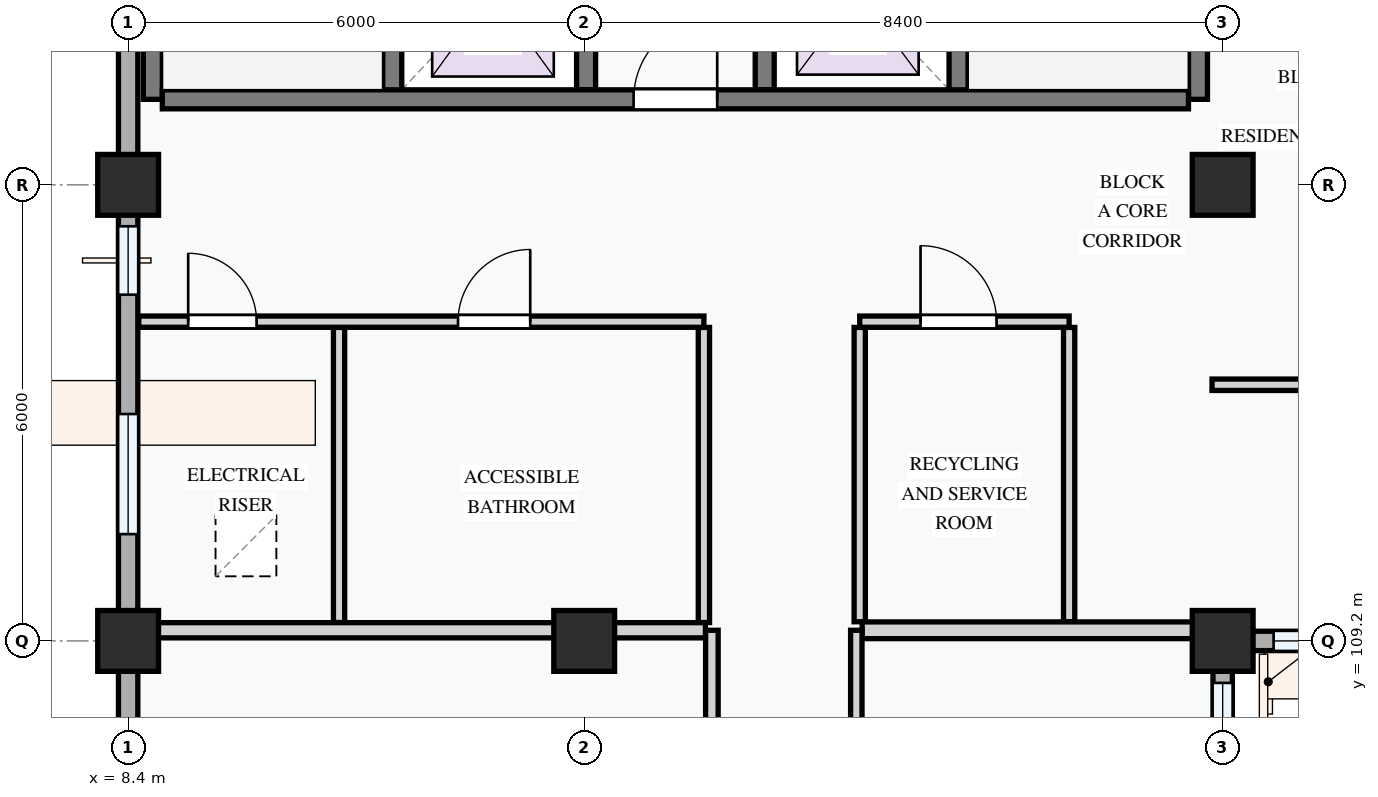
"""IFC4 building model, lengths in metres.
Left out: names, types, materials, properties, quantities, classifications, styles, units other than length and angle.
Written with IfcOpenShell. Run it as: python <this file> out.ifc"""

import sys

from ifc_helpers import new_model, si_unit, direction, frame, frame_2d, origin, origin_2d, place, context, subcontext, project, spatial, rectangle, extrude, element, fill, save


model = new_model("IFC4")
c1 = context("Model", 3, precision=1e-05, world=origin(), true_north=direction((0.0, 1.0)))
c2 = subcontext(c1, "Body", "Model", "MODEL_VIEW")
j1 = project(units=[si_unit("LENGTHUNIT", "METRE"), si_unit("PLANEANGLEUNIT", "RADIAN")], contexts=[c1])
p1 = place(None, origin())
s1 = spatial("IfcSite", under=j1, at=p1, CompositionType="ELEMENT")
p2 = place(p1, origin())
s2 = spatial("IfcBuilding", under=s1, at=p2, CompositionType="ELEMENT")
p3 = place(p2, frame((0.0, 0.0, 4.5)))
s3 = spatial("IfcBuildingStorey", under=s2, at=p3, CompositionType="ELEMENT", Elevation=4.5)
for number, where, z_axis, x_axis in (
    (1, (8.4, 109.2, 0.0), (0.0, 0.0, 1.0), (1.0, 0.0, 0.0)),
    (2, (8.4, 115.2, 0.0), (0.0, 0.0, 1.0), (1.0, 0.0, 0.0)),
    (3, (14.4, 109.2, 0.0), (0.0, 0.0, 1.0), (1.0, 0.0, 0.0)),
    (4, (22.8, 109.2, 0.0), (0.0, 0.0, 1.0), (1.0, 0.0, 0.0)),
    (5, (22.8, 115.2, 0.0), (0.0, 0.0, 1.0), (1.0, 0.0, 0.0)),
):
    element("IfcColumn", number, at=place(p3, frame(where, z_axis=z_axis, x_axis=x_axis)), inside=s3, PredefinedType="COLUMN", context=c2, shape_type="SweptSolid", body=[
        extrude(rectangle(XDim=0.8, YDim=0.8, at=origin_2d()), origin(), (0.0, 0.0, 1.0), 3.6),
    ])
p4 = place(p3, frame((22.8, 109.2, 0.0), z_axis=(0.0, 0.0, 1.0), x_axis=(1.0, 0.0, 0.0)))
e6 = element("IfcWall", 6, at=p4, inside=s3, PredefinedType="STANDARD", context=c2, shape_type="SweptSolid", body=[
    extrude(rectangle(XDim=6.0, YDim=0.255, at=frame_2d((3.0, 0.0))), origin(), (0.0, 0.0, 1.0), 2.775),
])
p5 = place(p4, frame((0.67, 0.0, 0.78)))
e7 = element("IfcOpeningElement", 7, at=p5, cuts=e6, PredefinedType="OPENING", context=c2, shape_type="SweptSolid", body=[
    extrude(rectangle(XDim=1.2, YDim=1.5, at=frame_2d((0.6, 0.75))), frame((0.0, 0.137, 0.0), z_axis=(0.0, -1.0, 0.0), x_axis=(1.0, 0.0, 0.0)), (0.0, 0.0, 1.0), 0.275),
])
p6 = place(p4, frame((2.88, 0.0, 0.78)))
e8 = element("IfcOpeningElement", 8, at=p6, cuts=e6, PredefinedType="OPENING", context=c2, shape_type="SweptSolid", body=[
    extrude(rectangle(XDim=2.4, YDim=1.85, at=frame_2d((1.2, 0.925))), frame((0.0, 0.137, 0.0), z_axis=(0.0, -1.0, 0.0), x_axis=(1.0, 0.0, 0.0)), (0.0, 0.0, 1.0), 0.275),
])
p7 = place(p3, frame((8.4, 123.6, 0.0), z_axis=(0.0, 0.0, 1.0), x_axis=(0.0, -1.0, 0.0)))
e9 = element("IfcWall", 9, at=p7, inside=s3, PredefinedType="STANDARD", context=c2, shape_type="SweptSolid", body=[
    extrude(rectangle(XDim=8.4, YDim=0.255, at=frame_2d((4.2, 0.0))), origin(), (0.0, 0.0, 1.0), 2.725),
])
p8 = place(p7, frame((1.336, 0.0, 0.78)))
e10 = element("IfcOpeningElement", 10, at=p8, cuts=e9, PredefinedType="OPENING", context=c2, shape_type="SweptSolid", body=[
    extrude(rectangle(XDim=1.32, YDim=1.35, at=frame_2d((0.66, 0.675))), frame((0.0, 0.137, 0.0), z_axis=(0.0, -1.0, 0.0), x_axis=(1.0, 0.0, 0.0)), (0.0, 0.0, 1.0), 0.275),
])
p9 = place(p7, frame((4.629, 0.0, 0.78)))
e11 = element("IfcOpeningElement", 11, at=p9, cuts=e9, PredefinedType="OPENING", context=c2, shape_type="SweptSolid", body=[
    extrude(rectangle(XDim=1.68, YDim=1.46, at=frame_2d((0.84, 0.73))), frame((0.0, 0.137, 0.0), z_axis=(0.0, -1.0, 0.0), x_axis=(1.0, 0.0, 0.0)), (0.0, 0.0, 1.0), 0.275),
])
p10 = place(p3, frame((8.4, 115.2, 0.0), z_axis=(0.0, 0.0, 1.0), x_axis=(0.0, -1.0, 0.0)))
e12 = element("IfcWall", 12, at=p10, inside=s3, PredefinedType="STANDARD", context=c2, shape_type="SweptSolid", body=[
    extrude(rectangle(XDim=6.0, YDim=0.255, at=frame_2d((3.0, 0.0))), origin(), (0.0, 0.0, 1.0), 2.875),
])
p11 = place(p10, frame((0.545, 0.0, 0.78)))
e13 = element("IfcOpeningElement", 13, at=p11, cuts=e12, PredefinedType="OPENING", context=c2, shape_type="SweptSolid", body=[
    extrude(rectangle(XDim=0.9, YDim=1.2, at=frame_2d((0.45, 0.6))), frame((0.0, 0.137, 0.0), z_axis=(0.0, -1.0, 0.0), x_axis=(1.0, 0.0, 0.0)), (0.0, 0.0, 1.0), 0.275),
])
p12 = place(p10, frame((3.015, 0.0, 0.78)))
e14 = element("IfcOpeningElement", 14, at=p12, cuts=e12, PredefinedType="OPENING", context=c2, shape_type="SweptSolid", body=[
    extrude(rectangle(XDim=1.58, YDim=1.48, at=frame_2d((0.79, 0.74))), frame((0.0, 0.137, 0.0), z_axis=(0.0, -1.0, 0.0), x_axis=(1.0, 0.0, 0.0)), (0.0, 0.0, 1.0), 0.275),
])
p13 = place(p3, frame((8.4, 109.2, 0.0), z_axis=(0.0, 0.0, 1.0), x_axis=(0.0, -1.0, 0.0)))
e15 = element("IfcWall", 15, at=p13, inside=s3, PredefinedType="STANDARD", context=c2, shape_type="SweptSolid", body=[
    extrude(rectangle(XDim=8.4, YDim=0.255, at=frame_2d((4.2, 0.0))), origin(), (0.0, 0.0, 1.0), 2.725),
])
p14 = place(p13, frame((1.133, 0.0, 0.78)))
e16 = element("IfcOpeningElement", 16, at=p14, cuts=e15, PredefinedType="OPENING", context=c2, shape_type="SweptSolid", body=[
    extrude(rectangle(XDim=1.42, YDim=1.38, at=frame_2d((0.71, 0.69))), frame((0.0, 0.137, 0.0), z_axis=(0.0, -1.0, 0.0), x_axis=(1.0, 0.0, 0.0)), (0.0, 0.0, 1.0), 0.275),
])
p15 = place(p13, frame((4.117, 0.0, 0.78)))
e17 = element("IfcOpeningElement", 17, at=p15, cuts=e15, PredefinedType="OPENING", context=c2, shape_type="SweptSolid", body=[
    extrude(rectangle(XDim=1.78, YDim=1.42, at=frame_2d((0.89, 0.71))), frame((0.0, 0.137, 0.0), z_axis=(0.0, -1.0, 0.0), x_axis=(1.0, 0.0, 0.0)), (0.0, 0.0, 1.0), 0.275),
])
p16 = place(p13, frame((6.985, 0.0, 0.78)))
e18 = element("IfcOpeningElement", 18, at=p16, cuts=e15, PredefinedType="OPENING", context=c2, shape_type="SweptSolid", body=[
    extrude(rectangle(XDim=0.9, YDim=1.2, at=frame_2d((0.45, 0.6))), frame((0.0, 0.137, 0.0), z_axis=(0.0, -1.0, 0.0), x_axis=(1.0, 0.0, 0.0)), (0.0, 0.0, 1.0), 0.275),
])
p17 = place(p3, frame((22.8, 100.8, 0.0), z_axis=(0.0, 0.0, 1.0), x_axis=(0.0, 1.0, 0.0)))
e19 = element("IfcWall", 19, at=p17, inside=s3, PredefinedType="STANDARD", context=c2, shape_type="SweptSolid", body=[
    extrude(rectangle(XDim=8.4, YDim=0.255, at=frame_2d((4.2, 0.0))), origin(), (0.0, 0.0, 1.0), 2.725),
])
p18 = place(p17, frame((0.515, 0.0, 0.78)))
e20 = element("IfcOpeningElement", 20, at=p18, cuts=e19, PredefinedType="OPENING", context=c2, shape_type="SweptSolid", body=[
    extrude(rectangle(XDim=0.9, YDim=1.2, at=frame_2d((0.45, 0.6))), frame((0.0, 0.137, 0.0), z_axis=(0.0, -1.0, 0.0), x_axis=(1.0, 0.0, 0.0)), (0.0, 0.0, 1.0), 0.275),
])
p19 = place(p17, frame((2.272, 0.0, 0.78)))
e21 = element("IfcOpeningElement", 21, at=p19, cuts=e19, PredefinedType="OPENING", context=c2, shape_type="SweptSolid", body=[
    extrude(rectangle(XDim=2.24, YDim=1.52, at=frame_2d((1.12, 0.76))), frame((0.0, 0.137, 0.0), z_axis=(0.0, -1.0, 0.0), x_axis=(1.0, 0.0, 0.0)), (0.0, 0.0, 1.0), 0.275),
])
p20 = place(p17, frame((5.268, 0.0, 0.78)))
e22 = element("IfcOpeningElement", 22, at=p20, cuts=e19, PredefinedType="OPENING", context=c2, shape_type="SweptSolid", body=[
    extrude(rectangle(XDim=2.58, YDim=1.48, at=frame_2d((1.29, 0.74))), frame((0.0, 0.137, 0.0), z_axis=(0.0, -1.0, 0.0), x_axis=(1.0, 0.0, 0.0)), (0.0, 0.0, 1.0), 0.275),
])
p21 = place(p3, frame((11.875, 123.25, 0.0), z_axis=(0.0, 0.0, 1.0), x_axis=(0.0, -1.0, 0.0)))
e23 = element("IfcWall", 23, at=p21, inside=s3, PredefinedType="SHEAR", context=c2, shape_type="SweptSolid", body=[
    extrude(rectangle(XDim=6.925, YDim=0.25, at=frame_2d((3.462, 0.0))), origin(), (0.0, 0.0, 1.0), 3.3),
])
p22 = place(p21, frame((0.35, 0.0, 0.0)))
e24 = element("IfcOpeningElement", 24, at=p22, cuts=e23, PredefinedType="OPENING", context=c2, shape_type="SweptSolid", body=[
    extrude(rectangle(XDim=0.95, YDim=2.1, at=frame_2d((0.475, 1.05))), frame((0.0, 0.135, 0.0), z_axis=(0.0, -1.0, 0.0), x_axis=(1.0, 0.0, 0.0)), (0.0, 0.0, 1.0), 0.27),
])
p23 = place(p3, frame((8.725, 123.4, 0.0), z_axis=(0.0, 0.0, 1.0), x_axis=(0.0, -1.0, 0.0)))
e25 = element("IfcWall", 25, at=p23, inside=s3, PredefinedType="SHEAR", context=c2, shape_type="SweptSolid", body=[
    extrude(rectangle(XDim=7.075, YDim=0.25, at=frame_2d((3.538, 0.0))), origin(), (0.0, 0.0, 1.0), 3.3),
])
p24 = place(p3, frame((22.475, 123.25, 0.0), z_axis=(0.0, 0.0, 1.0), x_axis=(0.0, -1.0, 0.0)))
e26 = element("IfcWall", 26, at=p24, inside=s3, PredefinedType="SHEAR", context=c2, shape_type="SweptSolid", body=[
    extrude(rectangle(XDim=6.925, YDim=0.25, at=frame_2d((3.462, 0.0))), origin(), (0.0, 0.0, 1.0), 3.3),
])
p25 = place(p3, frame((19.325, 123.25, 0.0), z_axis=(0.0, 0.0, 1.0), x_axis=(0.0, -1.0, 0.0)))
e27 = element("IfcWall", 27, at=p25, inside=s3, PredefinedType="SHEAR", context=c2, shape_type="SweptSolid", body=[
    extrude(rectangle(XDim=6.925, YDim=0.25, at=frame_2d((3.462, 0.0))), origin(), (0.0, 0.0, 1.0), 3.3),
])
p26 = place(p25, frame((0.35, 0.0, 0.0)))
e28 = element("IfcOpeningElement", 28, at=p26, cuts=e27, PredefinedType="OPENING", context=c2, shape_type="SweptSolid", body=[
    extrude(rectangle(XDim=0.95, YDim=2.1, at=frame_2d((0.475, 1.05))), frame((0.0, 0.135, 0.0), z_axis=(0.0, -1.0, 0.0), x_axis=(1.0, 0.0, 0.0)), (0.0, 0.0, 1.0), 0.27),
])
for number, where, z_axis, x_axis in (
    (29, (14.425, 118.875, 0.0), (0.0, 0.0, 1.0), (0.0, -1.0, 0.0)),
    (30, (16.775, 118.875, 0.0), (0.0, 0.0, 1.0), (0.0, -1.0, 0.0)),
):
    element("IfcWall", number, at=place(p3, frame(where, z_axis=z_axis, x_axis=x_axis)), inside=s3, PredefinedType="SHEAR", context=c2, shape_type="SweptSolid", body=[
        extrude(rectangle(XDim=2.425, YDim=0.25, at=frame_2d((1.212, 0.0))), origin(), (0.0, 0.0, 1.0), 3.3),
    ])
p27 = place(p3, frame((8.85, 116.325, 0.0), z_axis=(0.0, 0.0, 1.0), x_axis=(1.0, 0.0, 0.0)))
e31 = element("IfcWall", 31, at=p27, inside=s3, PredefinedType="SHEAR", context=c2, shape_type="SweptSolid", body=[
    extrude(rectangle(XDim=13.5, YDim=0.25, at=frame_2d((6.75, 0.0))), origin(), (0.0, 0.0, 1.0), 3.3),
])
p28 = place(p27, frame((6.2, 0.0, 0.0)))
e32 = element("IfcOpeningElement", 32, at=p28, cuts=e31, PredefinedType="OPENING", context=c2, shape_type="SweptSolid", body=[
    extrude(rectangle(XDim=1.1, YDim=2.15, at=frame_2d((0.55, 1.075))), frame((0.0, 0.135, 0.0), z_axis=(0.0, -1.0, 0.0), x_axis=(1.0, 0.0, 0.0)), (0.0, 0.0, 1.0), 0.27),
])
for number, where, z_axis, x_axis in (
    (33, (11.175, 113.324, 0.0), (0.0, 0.0, 1.0), (0.0, -1.0, 0.0)),
    (34, (15.975, 113.324, 0.0), (0.0, 0.0, 1.0), (0.0, -1.0, 0.0)),
):
    element("IfcWall", number, at=place(p3, frame(where, z_axis=z_axis, x_axis=x_axis)), inside=s3, PredefinedType="PARTITIONING", context=c2, shape_type="SweptSolid", body=[
        extrude(rectangle(XDim=3.882, YDim=0.148, at=frame_2d((1.941, 0.0))), origin(), (0.0, 0.0, 1.0), 3.3),
    ])
for number, where, z_axis, x_axis in (
    (35, (18.025, 113.324, 0.0), (0.0, 0.0, 1.0), (0.0, -1.0, 0.0)),
    (36, (20.78, 113.324, 0.0), (0.0, 0.0, 1.0), (0.0, -1.0, 0.0)),
):
    element("IfcWall", number, at=place(p3, frame(where, z_axis=z_axis, x_axis=x_axis)), inside=s3, PredefinedType="PARTITIONING", context=c2, shape_type="SweptSolid", body=[
        extrude(rectangle(XDim=3.872, YDim=0.148, at=frame_2d((1.936, 0.0))), origin(), (0.0, 0.0, 1.0), 3.3),
    ])
p29 = place(p3, frame((8.54, 113.4, 0.0), z_axis=(0.0, 0.0, 1.0), x_axis=(1.0, 0.0, 0.0)))
e37 = element("IfcWall", 37, at=p29, inside=s3, PredefinedType="PARTITIONING", context=c2, shape_type="SweptSolid", body=[
    extrude(rectangle(XDim=7.435, YDim=0.148, at=frame_2d((3.718, 0.0))), origin(), (0.0, 0.0, 1.0), 3.3),
])
p30 = place(p29, frame((0.65, 0.0, 0.0)))
e38 = element("IfcOpeningElement", 38, at=p30, cuts=e37, PredefinedType="OPENING", context=c2, shape_type="SweptSolid", body=[
    extrude(rectangle(XDim=0.9, YDim=2.1, at=frame_2d((0.45, 1.05))), frame((0.0, 0.084, 0.0), z_axis=(0.0, -1.0, 0.0), x_axis=(1.0, 0.0, 0.0)), (0.0, 0.0, 1.0), 0.168),
])
p31 = place(p29, frame((4.2, 0.0, 0.0)))
e39 = element("IfcOpeningElement", 39, at=p31, cuts=e37, PredefinedType="OPENING", context=c2, shape_type="SweptSolid", body=[
    extrude(rectangle(XDim=0.95, YDim=2.1, at=frame_2d((0.475, 1.05))), frame((0.0, 0.084, 0.0), z_axis=(0.0, -1.0, 0.0), x_axis=(1.0, 0.0, 0.0)), (0.0, 0.0, 1.0), 0.168),
])
p32 = place(p3, frame((18.025, 113.4, 0.0), z_axis=(0.0, 0.0, 1.0), x_axis=(1.0, 0.0, 0.0)))
e40 = element("IfcWall", 40, at=p32, inside=s3, PredefinedType="PARTITIONING", context=c2, shape_type="SweptSolid", body=[
    extrude(rectangle(XDim=2.755, YDim=0.148, at=frame_2d((1.377, 0.0))), origin(), (0.0, 0.0, 1.0), 3.3),
])
p33 = place(p32, frame((0.8, 0.0, 0.0)))
e41 = element("IfcOpeningElement", 41, at=p33, cuts=e40, PredefinedType="OPENING", context=c2, shape_type="SweptSolid", body=[
    extrude(rectangle(XDim=1.0, YDim=2.15, at=frame_2d((0.5, 1.075))), frame((0.0, 0.084, 0.0), z_axis=(0.0, -1.0, 0.0), x_axis=(1.0, 0.0, 0.0)), (0.0, 0.0, 1.0), 0.168),
])
p34 = place(p3, frame((22.66, 112.57, 0.0), z_axis=(0.0, 0.0, 1.0), x_axis=(1.0, 0.0, 0.0)))
e42 = element("IfcWall", 42, at=p34, inside=s3, PredefinedType="PARTITIONING", context=c2, shape_type="SweptSolid", body=[
    extrude(rectangle(XDim=2.406, YDim=0.15, at=frame_2d((1.203, 0.0))), origin(), (0.0, 0.0, 1.0), 3.3),
])
p35 = place(p3, frame((8.53, 109.34, 0.0), z_axis=(0.0, 0.0, 1.0), x_axis=(1.0, 0.0, 0.0)))
e43 = element("IfcWall", 43, at=p35, inside=s3, PredefinedType="PARTITIONING", context=c2, shape_type="SweptSolid", body=[
    extrude(rectangle(XDim=7.466, YDim=0.2, at=frame_2d((3.733, 0.0))), origin(), (0.0, 0.0, 1.0), 2.675),
])
p36 = place(p3, frame((18.057, 109.34, 0.0), z_axis=(0.0, 0.0, 1.0), x_axis=(1.0, 0.0, 0.0)))
e44 = element("IfcWall", 44, at=p36, inside=s3, PredefinedType="PARTITIONING", context=c2, shape_type="SweptSolid", body=[
    extrude(rectangle(XDim=4.683, YDim=0.22, at=frame_2d((2.342, 0.0))), origin(), (0.0, 0.0, 1.0), 2.675),
])
p37 = place(p3, frame((16.08, 72.06, 0.0), z_axis=(0.0, 0.0, 1.0), x_axis=(0.0, 1.0, 0.0)))
e45 = element("IfcWall", 45, at=p37, inside=s3, PredefinedType="PARTITIONING", context=c2, shape_type="SweptSolid", body=[
    extrude(rectangle(XDim=37.28, YDim=0.165, at=frame_2d((18.64, 0.0))), origin(), (0.0, 0.0, 1.0), 3.3),
])
p38 = place(p37, frame((3.772, 0.0, 0.0)))
e46 = element("IfcOpeningElement", 46, at=p38, cuts=e45, PredefinedType="OPENING", context=c2, shape_type="SweptSolid", body=[
    extrude(rectangle(XDim=0.95, YDim=2.1, at=frame_2d((0.475, 1.05))), frame((0.0, 0.093, 0.0), z_axis=(0.0, -1.0, 0.0), x_axis=(1.0, 0.0, 0.0)), (0.0, 0.0, 1.0), 0.185),
])
p39 = place(p37, frame((17.946, 0.0, 0.0)))
e47 = element("IfcOpeningElement", 47, at=p39, cuts=e45, PredefinedType="OPENING", context=c2, shape_type="SweptSolid", body=[
    extrude(rectangle(XDim=0.95, YDim=2.1, at=frame_2d((0.475, 1.05))), frame((0.0, 0.093, 0.0), z_axis=(0.0, -1.0, 0.0), x_axis=(1.0, 0.0, 0.0)), (0.0, 0.0, 1.0), 0.185),
])
p40 = place(p37, frame((25.364, 0.0, 0.0)))
e48 = element("IfcOpeningElement", 48, at=p40, cuts=e45, PredefinedType="OPENING", context=c2, shape_type="SweptSolid", body=[
    extrude(rectangle(XDim=0.95, YDim=2.1, at=frame_2d((0.475, 1.05))), frame((0.0, 0.093, 0.0), z_axis=(0.0, -1.0, 0.0), x_axis=(1.0, 0.0, 0.0)), (0.0, 0.0, 1.0), 0.185),
])
p41 = place(p37, frame((32.402, 0.0, 0.0)))
e49 = element("IfcOpeningElement", 49, at=p41, cuts=e45, PredefinedType="OPENING", context=c2, shape_type="SweptSolid", body=[
    extrude(rectangle(XDim=0.95, YDim=2.1, at=frame_2d((0.475, 1.05))), frame((0.0, 0.093, 0.0), z_axis=(0.0, -1.0, 0.0), x_axis=(1.0, 0.0, 0.0)), (0.0, 0.0, 1.0), 0.185),
])
p42 = place(p3, frame((17.98, 72.06, 0.0), z_axis=(0.0, 0.0, 1.0), x_axis=(0.0, 1.0, 0.0)))
e50 = element("IfcWall", 50, at=p42, inside=s3, PredefinedType="PARTITIONING", context=c2, shape_type="SweptSolid", body=[
    extrude(rectangle(XDim=37.28, YDim=0.15, at=frame_2d((18.64, 0.0))), origin(), (0.0, 0.0, 1.0), 3.3),
])
p43 = place(p42, frame((3.768, 0.0, 0.0)))
e51 = element("IfcOpeningElement", 51, at=p43, cuts=e50, PredefinedType="OPENING", context=c2, shape_type="SweptSolid", body=[
    extrude(rectangle(XDim=0.92, YDim=2.1, at=frame_2d((0.46, 1.05))), frame((0.0, 0.085, 0.0), z_axis=(0.0, -1.0, 0.0), x_axis=(1.0, 0.0, 0.0)), (0.0, 0.0, 1.0), 0.17),
])
p44 = place(p42, frame((18.18, 0.0, 0.0)))
e52 = element("IfcOpeningElement", 52, at=p44, cuts=e50, PredefinedType="OPENING", context=c2, shape_type="SweptSolid", body=[
    extrude(rectangle(XDim=0.96, YDim=2.12, at=frame_2d((0.48, 1.06))), frame((0.0, 0.085, 0.0), z_axis=(0.0, -1.0, 0.0), x_axis=(1.0, 0.0, 0.0)), (0.0, 0.0, 1.0), 0.17),
])
p45 = place(p42, frame((25.358, 0.0, 0.0)))
e53 = element("IfcOpeningElement", 53, at=p45, cuts=e50, PredefinedType="OPENING", context=c2, shape_type="SweptSolid", body=[
    extrude(rectangle(XDim=0.92, YDim=2.1, at=frame_2d((0.46, 1.05))), frame((0.0, 0.085, 0.0), z_axis=(0.0, -1.0, 0.0), x_axis=(1.0, 0.0, 0.0)), (0.0, 0.0, 1.0), 0.17),
])
p46 = place(p42, frame((32.399, 0.0, 0.0)))
e54 = element("IfcOpeningElement", 54, at=p46, cuts=e50, PredefinedType="OPENING", context=c2, shape_type="SweptSolid", body=[
    extrude(rectangle(XDim=0.92, YDim=2.1, at=frame_2d((0.46, 1.05))), frame((0.0, 0.085, 0.0), z_axis=(0.0, -1.0, 0.0), x_axis=(1.0, 0.0, 0.0)), (0.0, 0.0, 1.0), 0.17),
])
p47 = place(p5, origin())
e55 = element("IfcWindow", 55, at=p47, inside=s3, PartitioningType="SINGLE_PANEL", PredefinedType="WINDOW", context=c2, shape_type="SweptSolid", body=[
    extrude(rectangle(XDim=1.2, YDim=1.5, at=frame_2d((0.6, 0.75))), frame((0.0, 0.03, 0.0), z_axis=(0.0, -1.0, 0.0), x_axis=(1.0, 0.0, 0.0)), (0.0, 0.0, 1.0), 0.06),
])
fill(e7, e55)
p48 = place(p11, origin())
e56 = element("IfcWindow", 56, at=p48, inside=s3, PartitioningType="SINGLE_PANEL", PredefinedType="WINDOW", context=c2, shape_type="SweptSolid", body=[
    extrude(rectangle(XDim=0.9, YDim=1.2, at=frame_2d((0.45, 0.6))), frame((0.0, 0.03, 0.0), z_axis=(0.0, -1.0, 0.0), x_axis=(1.0, 0.0, 0.0)), (0.0, 0.0, 1.0), 0.06),
])
fill(e13, e56)
p49 = place(p12, origin())
e57 = element("IfcWindow", 57, at=p49, inside=s3, PartitioningType="SINGLE_PANEL", PredefinedType="WINDOW", context=c2, shape_type="SweptSolid", body=[
    extrude(rectangle(XDim=1.58, YDim=1.48, at=frame_2d((0.79, 0.74))), frame((0.0, 0.03, 0.0), z_axis=(0.0, -1.0, 0.0), x_axis=(1.0, 0.0, 0.0)), (0.0, 0.0, 1.0), 0.06),
])
fill(e14, e57)
p50 = place(p20, origin())
e58 = element("IfcWindow", 58, at=p50, inside=s3, PartitioningType="DOUBLE_PANEL_VERTICAL", PredefinedType="WINDOW", context=c2, shape_type="SweptSolid", body=[
    extrude(rectangle(XDim=2.58, YDim=1.48, at=frame_2d((1.29, 0.74))), frame((0.0, 0.03, 0.0), z_axis=(0.0, -1.0, 0.0), x_axis=(1.0, 0.0, 0.0)), (0.0, 0.0, 1.0), 0.06),
])
fill(e22, e58)
p51 = place(p28, origin())
e59 = element("IfcDoor", 59, at=p51, inside=s3, OperationType="SINGLE_SWING_RIGHT", PredefinedType="DOOR", context=c2, shape_type="SweptSolid", body=[
    extrude(rectangle(XDim=1.1, YDim=2.15, at=frame_2d((0.55, 1.075))), frame((0.0, 0.025, 0.0), z_axis=(0.0, -1.0, 0.0), x_axis=(1.0, 0.0, 0.0)), (0.0, 0.0, 1.0), 0.05),
])
fill(e32, e59)
p52 = place(p30, origin())
e60 = element("IfcDoor", 60, at=p52, inside=s3, OperationType="SINGLE_SWING_LEFT", PredefinedType="DOOR", context=c2, shape_type="SweptSolid", body=[
    extrude(rectangle(XDim=0.9, YDim=2.1, at=frame_2d((0.45, 1.05))), frame((0.0, 0.025, 0.0), z_axis=(0.0, -1.0, 0.0), x_axis=(1.0, 0.0, 0.0)), (0.0, 0.0, 1.0), 0.05),
])
fill(e38, e60)
p53 = place(p31, origin())
e61 = element("IfcDoor", 61, at=p53, inside=s3, OperationType="SINGLE_SWING_RIGHT", PredefinedType="DOOR", context=c2, shape_type="SweptSolid", body=[
    extrude(rectangle(XDim=0.95, YDim=2.1, at=frame_2d((0.475, 1.05))), frame((0.0, 0.025, 0.0), z_axis=(0.0, -1.0, 0.0), x_axis=(1.0, 0.0, 0.0)), (0.0, 0.0, 1.0), 0.05),
])
fill(e39, e61)
p54 = place(p33, origin())
e62 = element("IfcDoor", 62, at=p54, inside=s3, OperationType="SINGLE_SWING_LEFT", PredefinedType="DOOR", context=c2, shape_type="SweptSolid", body=[
    extrude(rectangle(XDim=1.0, YDim=2.15, at=frame_2d((0.5, 1.075))), frame((0.0, 0.025, 0.0), z_axis=(0.0, -1.0, 0.0), x_axis=(1.0, 0.0, 0.0)), (0.0, 0.0, 1.0), 0.05),
])
fill(e41, e62)
save(model, sys.argv[1])
